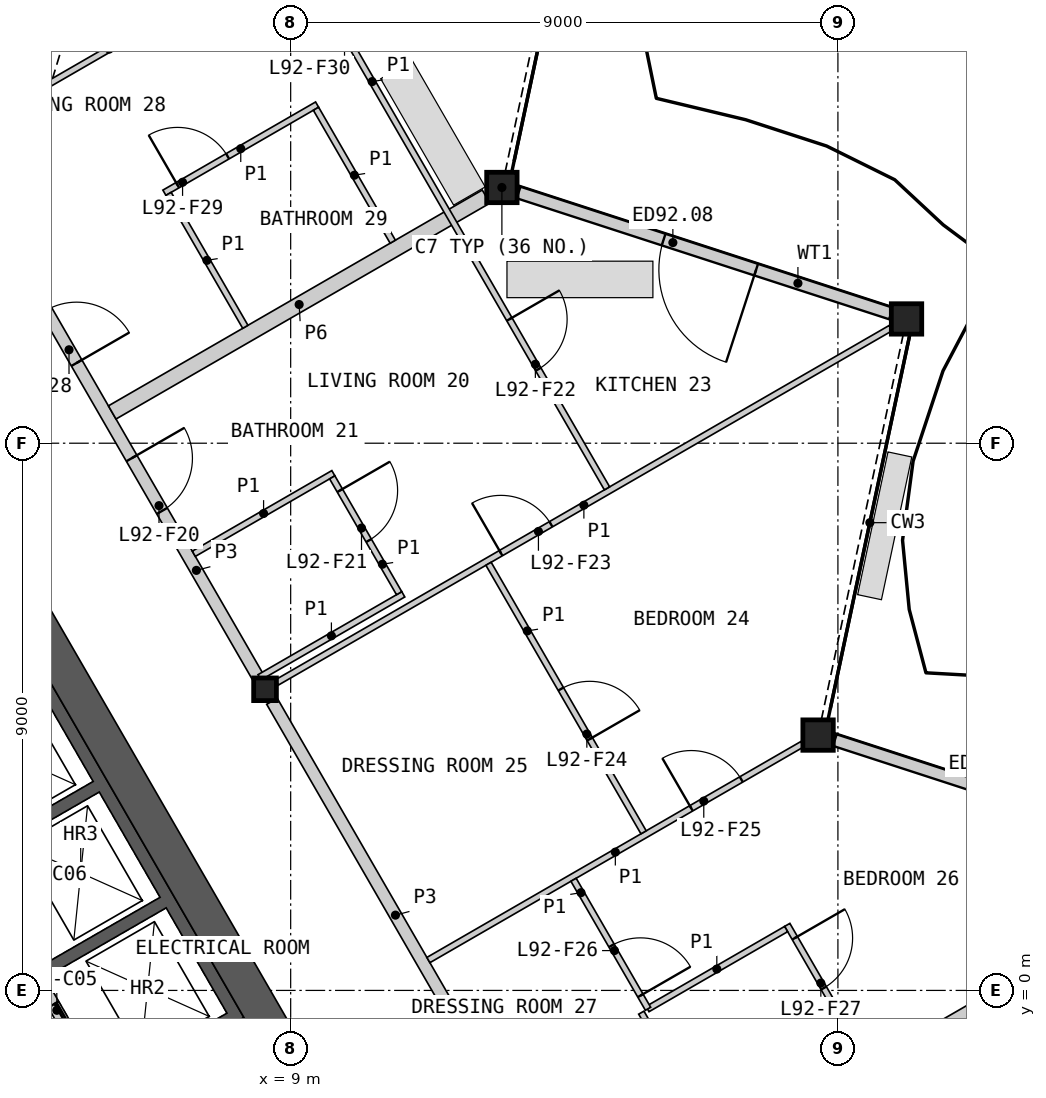
"""IFC4 building model, lengths in metres.
Left out: names, types, materials, properties, quantities, classifications, styles, units other than length and angle.
Written with IfcOpenShell. Run it as: python <this file> out.ifc"""

import sys

from ifc_helpers import new_model, si_unit, direction, frame, frame_2d, origin, origin_2d, place, context, subcontext, project, spatial, polyline, rectangle, hollow_rectangle, i_section, outline, extrude, element, fill, save


model = new_model("IFC4")
c1 = context("Model", 3, precision=1e-05, world=origin(), true_north=direction((0.0, 1.0)))
c2 = subcontext(c1, "Body", "Model", "MODEL_VIEW")
j1 = project(units=[si_unit("LENGTHUNIT", "METRE"), si_unit("PLANEANGLEUNIT", "RADIAN")], contexts=[c1])
p1 = place(None, origin())
s1 = spatial("IfcSite", under=j1, at=p1, CompositionType="ELEMENT")
p2 = place(p1, origin())
s2 = spatial("IfcBuilding", under=s1, at=p2, CompositionType="ELEMENT")
p3 = place(p2, frame((0.0, 0.0, 401.8)))
s3 = spatial("IfcBuildingStorey", under=s2, at=p3, CompositionType="ELEMENT", Elevation=401.8)
for number, where, z_axis, x_axis in (
    (1, (17.674, 4.199, 0.0), (0.0, 0.0, 1.0), (1.0, 0.0, 0.0)),
    (2, (19.129, 11.044, 0.0), (0.0, 0.0, 1.0), (1.0, 0.0, 0.0)),
    (3, (12.474, 13.206, 0.0), (0.0, 0.0, 1.0), (1.0, 0.0, 0.0)),
):
    element("IfcColumn", number, at=place(p3, frame(where, z_axis=z_axis, x_axis=x_axis)), inside=s3, PredefinedType="COLUMN", context=c2, shape_type="SweptSolid", body=[
        extrude(hollow_rectangle(XDim=0.5, YDim=0.5, WallThickness=0.03, at=origin_2d()), origin(), (0.0, 0.0, 1.0), 3.4),
    ])
p4 = place(p3, frame((8.578, 4.953, 0.0), z_axis=(0.0, 0.0, 1.0), x_axis=(1.0, 0.0, 0.0)))
e4 = element("IfcColumn", 4, at=p4, inside=s3, PredefinedType="COLUMN", context=c2, shape_type="SweptSolid", body=[
    extrude(i_section(OverallWidth=0.374, OverallDepth=0.372, WebThickness=0.016, FlangeThickness=0.026, at=origin_2d()), origin(), (0.0, 0.0, 1.0), 3.4),
])
p5 = place(p3, frame((24.074, 2.127, 0.0), z_axis=(0.0, 0.0, 1.0), x_axis=(-0.951055516513, 0.309020071371, 0.0)))
e5 = element("IfcWall", 5, at=p5, inside=s3, PredefinedType="SOLIDWALL", context=c2, shape_type="SweptSolid", body=[
    extrude(rectangle(XDim=6.44, YDim=0.2, at=frame_2d((3.22, 0.0))), origin(), (0.0, 0.0, 1.0), 2.634),
])
p6 = place(p5, frame((2.333, 0.0, 0.0)))
e6 = element("IfcOpeningElement", 6, at=p6, cuts=e5, PredefinedType="OPENING", context=c2, shape_type="SweptSolid", body=[
    extrude(rectangle(XDim=1.6, YDim=2.25, at=frame_2d((0.8, 1.125))), frame((0.0, 0.11, 0.0), z_axis=(0.0, -1.0, 0.0), x_axis=(1.0, 0.0, 0.0)), (0.0, 0.0, 1.0), 0.22),
])
p7 = place(p3, frame((18.874, 11.134, 0.0), z_axis=(0.0, 0.0, 1.0), x_axis=(-0.951063037463, 0.308996923563, 0.0)))
e7 = element("IfcWall", 7, at=p7, inside=s3, PredefinedType="SOLIDWALL", context=c2, shape_type="SweptSolid", body=[
    extrude(rectangle(XDim=6.44, YDim=0.2, at=frame_2d((3.22, 0.0))), origin(), (0.0, 0.0, 1.0), 2.634),
])
p8 = place(p7, frame((2.333, 0.0, 0.0)))
e8 = element("IfcOpeningElement", 8, at=p8, cuts=e7, PredefinedType="OPENING", context=c2, shape_type="SweptSolid", body=[
    extrude(rectangle(XDim=1.6, YDim=2.25, at=frame_2d((0.8, 1.125))), frame((0.0, 0.11, 0.0), z_axis=(0.0, -1.0, 0.0), x_axis=(1.0, 0.0, 0.0)), (0.0, 0.0, 1.0), 0.22),
])
p9 = place(p3, origin())
e9 = element("IfcWall", 9, at=p9, inside=s3, PredefinedType="SHEAR", context=c2, shape_type="SweptSolid", body=[
    extrude(outline(polyline([(1.561, 6.097), (3.731, 7.35), (8.231, -0.444), (6.061, -1.697), (5.96, -1.524), (7.952, -0.374), (6.952, 1.358), (4.96, 0.208), (4.861, 0.381), (6.852, 1.531), (5.852, 3.263), (3.861, 2.113), (3.76, 2.287), (5.752, 3.437), (4.752, 5.169), (2.76, 4.019), (2.66, 4.192), (4.652, 5.342), (3.652, 7.074), (1.66, 5.924), (1.561, 6.097)])), origin(), (0.0, 0.0, 1.0), 3.1),
])
p10 = place(p3, frame((5.817, -1.476, 0.0), z_axis=(0.0, 0.0, 1.0), x_axis=(-0.500002616675, 0.866023893041, 0.0)))
e10 = element("IfcWall", 10, at=p10, inside=s3, PredefinedType="SOLIDWALL", context=c2, shape_type="SweptSolid", body=[
    extrude(rectangle(XDim=8.373, YDim=0.2, at=frame_2d((4.187, 0.0))), origin(), (0.0, 0.0, 1.0), 3.1),
])
p11 = place(p10, frame((0.337, 0.0, 0.0)))
e11 = element("IfcOpeningElement", 11, at=p11, cuts=e10, PredefinedType="OPENING", context=c2, shape_type="SweptSolid", body=[
    extrude(rectangle(XDim=1.1, YDim=2.1, at=frame_2d((0.55, 1.05))), frame((0.0, 0.11, 0.0), z_axis=(0.0, -1.0, 0.0), x_axis=(1.0, 0.0, 0.0)), (0.0, 0.0, 1.0), 0.22),
])
p12 = place(p10, frame((2.537, 0.0, 0.0)))
e12 = element("IfcOpeningElement", 12, at=p12, cuts=e10, PredefinedType="OPENING", context=c2, shape_type="SweptSolid", body=[
    extrude(rectangle(XDim=1.1, YDim=2.1, at=frame_2d((0.55, 1.05))), frame((0.0, 0.11, 0.0), z_axis=(0.0, -1.0, 0.0), x_axis=(1.0, 0.0, 0.0)), (0.0, 0.0, 1.0), 0.22),
])
p13 = place(p10, frame((4.737, 0.0, 0.0)))
e13 = element("IfcOpeningElement", 13, at=p13, cuts=e10, PredefinedType="OPENING", context=c2, shape_type="SweptSolid", body=[
    extrude(rectangle(XDim=1.1, YDim=2.1, at=frame_2d((0.55, 1.05))), frame((0.0, 0.11, 0.0), z_axis=(0.0, -1.0, 0.0), x_axis=(1.0, 0.0, 0.0)), (0.0, 0.0, 1.0), 0.22),
])
p14 = place(p10, frame((7.037, 0.0, 0.0)))
e14 = element("IfcOpeningElement", 14, at=p14, cuts=e10, PredefinedType="OPENING", context=c2, shape_type="SweptSolid", body=[
    extrude(rectangle(XDim=0.9, YDim=2.1, at=frame_2d((0.45, 1.05))), frame((0.0, 0.11, 0.0), z_axis=(0.0, -1.0, 0.0), x_axis=(1.0, 0.0, 0.0)), (0.0, 0.0, 1.0), 0.22),
])
p15 = place(p3, frame((8.686, -0.634, 0.0), z_axis=(0.0, 0.0, 1.0), x_axis=(-0.500004601921, 0.866022746848, 0.0)))
e15 = element("IfcWall", 15, at=p15, inside=s3, PredefinedType="SHEAR", context=c2, shape_type="SweptSolid", body=[
    extrude(rectangle(XDim=16.853, YDim=0.6, at=frame_2d((8.426, 0.0))), origin(), (0.0, 0.0, 1.0), 3.1),
])
p16 = place(p3, frame((8.692, 4.756, 0.0), z_axis=(0.0, 0.0, 1.0), x_axis=(0.500001682468, -0.866024432409, 0.0)))
e16 = element("IfcWall", 16, at=p16, inside=s3, PredefinedType="PARTITIONING", context=c2, shape_type="SweptSolid", body=[
    extrude(rectangle(XDim=8.124, YDim=0.2, at=frame_2d((4.062, 0.0))), origin(), (0.0, 0.0, 1.0), 3.1),
])
p17 = place(p3, frame((4.403, 12.185, 0.0), z_axis=(0.0, 0.0, 1.0), x_axis=(0.499992155518, -0.866029932751, 0.0)))
e17 = element("IfcWall", 17, at=p17, inside=s3, PredefinedType="PARTITIONING", context=c2, shape_type="SweptSolid", body=[
    extrude(rectangle(XDim=8.123, YDim=0.2, at=frame_2d((4.062, 0.0))), origin(), (0.0, 0.0, 1.0), 3.1),
])
p18 = place(p17, frame((3.963, 0.0, 0.0)))
e18 = element("IfcOpeningElement", 18, at=p18, cuts=e17, PredefinedType="OPENING", context=c2, shape_type="SweptSolid", body=[
    extrude(rectangle(XDim=1.0, YDim=2.1, at=frame_2d((0.5, 1.05))), frame((0.0, 0.11, 0.0), z_axis=(0.0, -1.0, 0.0), x_axis=(1.0, 0.0, 0.0)), (0.0, 0.0, 1.0), 0.22),
])
p19 = place(p17, frame((1.153, 0.0, 0.0)))
e19 = element("IfcOpeningElement", 19, at=p19, cuts=e17, PredefinedType="OPENING", context=c2, shape_type="SweptSolid", body=[
    extrude(rectangle(XDim=1.0, YDim=2.1, at=frame_2d((0.5, 1.05))), frame((0.0, 0.11, 0.0), z_axis=(0.0, -1.0, 0.0), x_axis=(1.0, 0.0, 0.0)), (0.0, 0.0, 1.0), 0.22),
])
p20 = place(p3, frame((6.065, 9.506, 0.0), z_axis=(0.0, 0.0, 1.0), x_axis=(0.866018949465, 0.500011179042, 0.0)))
e20 = element("IfcWall", 20, at=p20, inside=s3, PredefinedType="PARTITIONING", context=c2, shape_type="SweptSolid", body=[
    extrude(rectangle(XDim=7.1, YDim=0.25, at=frame_2d((3.55, 0.0))), origin(), (0.0, 0.0, 1.0), 2.33),
])
p21 = place(p3, frame((18.585, -1.279, 0.0), z_axis=(0.0, 0.0, 1.0), x_axis=(0.866023139795, 0.500003921324, 0.0)))
e21 = element("IfcWall", 21, at=p21, inside=s3, PredefinedType="PARTITIONING", context=c2, shape_type="SweptSolid", body=[
    extrude(rectangle(XDim=6.332, YDim=0.25, at=frame_2d((3.166, 0.0))), origin(), (0.0, 0.0, 1.0), 2.33),
])
p22 = place(p3, frame((3.465, 14.01, 0.0), z_axis=(0.0, 0.0, 1.0), x_axis=(0.866032376801, 0.499987922186, 0.0)))
e22 = element("IfcWall", 22, at=p22, inside=s3, PredefinedType="PARTITIONING", context=c2, shape_type="SweptSolid", body=[
    extrude(rectangle(XDim=11.782, YDim=0.1, at=frame_2d((5.891, 0.0))), origin(), (0.0, 0.0, 1.0), 2.33),
])
p23 = place(p22, frame((7.171, 0.0, 0.0)))
e23 = element("IfcOpeningElement", 23, at=p23, cuts=e22, PredefinedType="OPENING", context=c2, shape_type="SweptSolid", body=[
    extrude(rectangle(XDim=0.95, YDim=2.1, at=frame_2d((0.475, 1.05))), frame((0.0, 0.06, 0.0), z_axis=(0.0, -1.0, 0.0), x_axis=(1.0, 0.0, 0.0)), (0.0, 0.0, 1.0), 0.12),
])
p24 = place(p3, frame((8.775, 5.066, 0.0), z_axis=(0.0, 0.0, 1.0), x_axis=(0.866023724155, 0.500002909193, 0.0)))
e24 = element("IfcWall", 24, at=p24, inside=s3, PredefinedType="PARTITIONING", context=c2, shape_type="SweptSolid", body=[
    extrude(rectangle(XDim=11.655, YDim=0.1, at=frame_2d((5.827, 0.0))), origin(), (0.0, 0.0, 1.0), 2.33),
])
p25 = place(p24, frame((4.252, 0.0, 0.0)))
e25 = element("IfcOpeningElement", 25, at=p25, cuts=e24, PredefinedType="OPENING", context=c2, shape_type="SweptSolid", body=[
    extrude(rectangle(XDim=0.95, YDim=2.1, at=frame_2d((0.475, 1.05))), frame((0.0, 0.06, 0.0), z_axis=(0.0, -1.0, 0.0), x_axis=(1.0, 0.0, 0.0)), (0.0, 0.0, 1.0), 0.12),
])
p26 = place(p3, frame((9.052, 17.177, 0.0), z_axis=(0.0, 0.0, 1.0), x_axis=(0.499998765615, -0.866026116456, 0.0)))
e26 = element("IfcWall", 26, at=p26, inside=s3, PredefinedType="PARTITIONING", context=c2, shape_type="SweptSolid", body=[
    extrude(rectangle(XDim=10.3, YDim=0.1, at=frame_2d((5.15, 0.0))), origin(), (0.0, 0.0, 1.0), 2.33),
])
p27 = place(p26, frame((7.089, 0.0, 0.0)))
e27 = element("IfcOpeningElement", 27, at=p27, cuts=e26, PredefinedType="OPENING", context=c2, shape_type="SweptSolid", body=[
    extrude(rectangle(XDim=0.95, YDim=2.1, at=frame_2d((0.475, 1.05))), frame((0.0, 0.06, 0.0), z_axis=(0.0, -1.0, 0.0), x_axis=(1.0, 0.0, 0.0)), (0.0, 0.0, 1.0), 0.12),
])
p28 = place(p26, frame((0.954, 0.0, 0.0)))
e28 = element("IfcOpeningElement", 28, at=p28, cuts=e26, PredefinedType="OPENING", context=c2, shape_type="SweptSolid", body=[
    extrude(rectangle(XDim=0.95, YDim=2.1, at=frame_2d((0.475, 1.05))), frame((0.0, 0.06, 0.0), z_axis=(0.0, -1.0, 0.0), x_axis=(1.0, 0.0, 0.0)), (0.0, 0.0, 1.0), 0.12),
])
p29 = place(p3, frame((11.265, 0.5, 0.0), z_axis=(0.0, 0.0, 1.0), x_axis=(0.866033839264, 0.499985389037, 0.0)))
e29 = element("IfcWall", 29, at=p29, inside=s3, PredefinedType="PARTITIONING", context=c2, shape_type="SweptSolid", body=[
    extrude(rectangle(XDim=7.1, YDim=0.1, at=frame_2d((3.55, 0.0))), origin(), (0.0, 0.0, 1.0), 2.33),
])
p30 = place(p29, frame((4.992, 0.0, 0.0)))
e30 = element("IfcOpeningElement", 30, at=p30, cuts=e29, PredefinedType="OPENING", context=c2, shape_type="SweptSolid", body=[
    extrude(rectangle(XDim=0.95, YDim=2.1, at=frame_2d((0.475, 1.05))), frame((0.0, 0.06, 0.0), z_axis=(0.0, -1.0, 0.0), x_axis=(1.0, 0.0, 0.0)), (0.0, 0.0, 1.0), 0.12),
])
p31 = place(p3, frame((14.767, -0.365, 0.0), z_axis=(0.0, 0.0, 1.0), x_axis=(0.500002931134, -0.866023711487, 0.0)))
e31 = element("IfcWall", 31, at=p31, inside=s3, PredefinedType="PARTITIONING", context=c2, shape_type="SweptSolid", body=[
    extrude(rectangle(XDim=5.45, YDim=0.1, at=frame_2d((2.725, 0.0))), origin(), (0.0, 0.0, 1.0), 2.33),
])
p32 = place(p3, frame((17.167, 1.078, 0.0), z_axis=(0.0, 0.0, 1.0), x_axis=(0.499996545922, -0.866027397988, 0.0)))
e32 = element("IfcWall", 32, at=p32, inside=s3, PredefinedType="PARTITIONING", context=c2, shape_type="SweptSolid", body=[
    extrude(rectangle(XDim=5.5, YDim=0.1, at=frame_2d((2.75, 0.0))), origin(), (0.0, 0.0, 1.0), 2.33),
])
p33 = place(p32, frame((4.199, 0.0, 0.0)))
e33 = element("IfcOpeningElement", 33, at=p33, cuts=e32, PredefinedType="OPENING", context=c2, shape_type="SweptSolid", body=[
    extrude(rectangle(XDim=0.95, YDim=2.1, at=frame_2d((0.475, 1.05))), frame((0.0, 0.06, 0.0), z_axis=(0.0, -1.0, 0.0), x_axis=(1.0, 0.0, 0.0)), (0.0, 0.0, 1.0), 0.12),
])
p34 = place(p32, frame((0.25, 0.0, 0.0)))
e34 = element("IfcOpeningElement", 34, at=p34, cuts=e32, PredefinedType="OPENING", context=c2, shape_type="SweptSolid", body=[
    extrude(rectangle(XDim=0.95, YDim=2.1, at=frame_2d((0.475, 1.05))), frame((0.0, 0.06, 0.0), z_axis=(0.0, -1.0, 0.0), x_axis=(1.0, 0.0, 0.0)), (0.0, 0.0, 1.0), 0.12),
])
p35 = place(p3, frame((12.254, 7.017, 0.0), z_axis=(0.0, 0.0, 1.0), x_axis=(0.500005610874, -0.86602216432, 0.0)))
e35 = element("IfcWall", 35, at=p35, inside=s3, PredefinedType="PARTITIONING", context=c2, shape_type="SweptSolid", body=[
    extrude(rectangle(XDim=5.1, YDim=0.1, at=frame_2d((2.55, 0.0))), origin(), (0.0, 0.0, 1.0), 2.33),
])
p36 = place(p35, frame((2.379, 0.0, 0.0)))
e36 = element("IfcOpeningElement", 36, at=p36, cuts=e35, PredefinedType="OPENING", context=c2, shape_type="SweptSolid", body=[
    extrude(rectangle(XDim=0.95, YDim=2.1, at=frame_2d((0.475, 1.05))), frame((0.0, 0.06, 0.0), z_axis=(0.0, -1.0, 0.0), x_axis=(1.0, 0.0, 0.0)), (0.0, 0.0, 1.0), 0.12),
])
p37 = place(p3, frame((6.923, 13.119, 0.0), z_axis=(0.0, 0.0, 1.0), x_axis=(0.866032775405, 0.499987231761, 0.0)))
e37 = element("IfcWall", 37, at=p37, inside=s3, PredefinedType="PARTITIONING", context=c2, shape_type="SweptSolid", body=[
    extrude(rectangle(XDim=2.9, YDim=0.1, at=frame_2d((1.45, 0.0))), origin(), (0.0, 0.0, 1.0), 2.33),
])
p38 = place(p37, frame((0.25, 0.0, 0.0)))
e38 = element("IfcOpeningElement", 38, at=p38, cuts=e37, PredefinedType="OPENING", context=c2, shape_type="SweptSolid", body=[
    extrude(rectangle(XDim=0.95, YDim=2.1, at=frame_2d((0.475, 1.05))), frame((0.0, 0.06, 0.0), z_axis=(0.0, -1.0, 0.0), x_axis=(1.0, 0.0, 0.0)), (0.0, 0.0, 1.0), 0.12),
])
p39 = place(p3, frame((7.407, 7.182, 0.0), z_axis=(0.0, 0.0, 1.0), x_axis=(0.866052124492, 0.499953715521, 0.0)))
e39 = element("IfcWall", 39, at=p39, inside=s3, PredefinedType="PARTITIONING", context=c2, shape_type="SweptSolid", body=[
    extrude(rectangle(XDim=2.65, YDim=0.1, at=frame_2d((1.325, 0.0))), origin(), (0.0, 0.0, 1.0), 2.33),
])
p40 = place(p3, frame((9.417, 14.501, 0.0), z_axis=(0.0, 0.0, 1.0), x_axis=(0.500048846702, -0.865997200291, 0.0)))
e40 = element("IfcWall", 40, at=p40, inside=s3, PredefinedType="PARTITIONING", context=c2, shape_type="SweptSolid", body=[
    extrude(rectangle(XDim=2.525, YDim=0.1, at=frame_2d((1.263, 0.0))), origin(), (0.0, 0.0, 1.0), 2.33),
])
p41 = place(p3, frame((6.992, 13.101, 0.0), z_axis=(0.0, 0.0, 1.0), x_axis=(0.499976333282, -0.866039067339, 0.0)))
e41 = element("IfcWall", 41, at=p41, inside=s3, PredefinedType="PARTITIONING", context=c2, shape_type="SweptSolid", body=[
    extrude(rectangle(XDim=2.525, YDim=0.1, at=frame_2d((1.262, 0.0))), origin(), (0.0, 0.0, 1.0), 2.33),
])
p42 = place(p3, frame((14.868, -0.307, 0.0), z_axis=(0.0, 0.0, 1.0), x_axis=(0.865997164422, 0.50004890882, 0.0)))
e42 = element("IfcWall", 42, at=p42, inside=s3, PredefinedType="PARTITIONING", context=c2, shape_type="SweptSolid", body=[
    extrude(rectangle(XDim=2.633, YDim=0.1, at=frame_2d((1.316, 0.0))), origin(), (0.0, 0.0, 1.0), 2.33),
])
p43 = place(p3, frame((8.488, 5.15, 0.0), z_axis=(0.0, 0.0, 1.0), x_axis=(0.866027727466, 0.499995975244, 0.0)))
e43 = element("IfcWall", 43, at=p43, inside=s3, PredefinedType="PARTITIONING", context=c2, shape_type="SweptSolid", body=[
    extrude(rectangle(XDim=2.73, YDim=0.1, at=frame_2d((1.365, 0.0))), origin(), (0.0, 0.0, 1.0), 2.33),
])
p44 = place(p3, frame((13.652, 1.82, 0.0), z_axis=(0.0, 0.0, 1.0), x_axis=(0.500018594424, -0.866014668023, 0.0)))
e44 = element("IfcWall", 44, at=p44, inside=s3, PredefinedType="PARTITIONING", context=c2, shape_type="SweptSolid", body=[
    extrude(rectangle(XDim=2.45, YDim=0.1, at=frame_2d((1.225, 0.0))), origin(), (0.0, 0.0, 1.0), 2.33),
])
p45 = place(p44, frame((1.25, 0.0, 0.0)))
e45 = element("IfcOpeningElement", 45, at=p45, cuts=e44, PredefinedType="OPENING", context=c2, shape_type="SweptSolid", body=[
    extrude(rectangle(XDim=0.95, YDim=2.1, at=frame_2d((0.475, 1.05))), frame((0.0, 0.06, 0.0), z_axis=(0.0, -1.0, 0.0), x_axis=(1.0, 0.0, 0.0)), (0.0, 0.0, 1.0), 0.12),
])
p46 = place(p3, frame((9.684, 8.438, 0.0), z_axis=(0.0, 0.0, 1.0), x_axis=(0.499994660107, -0.866028486751, 0.0)))
e46 = element("IfcWall", 46, at=p46, inside=s3, PredefinedType="PARTITIONING", context=c2, shape_type="SweptSolid", body=[
    extrude(rectangle(XDim=2.2, YDim=0.1, at=frame_2d((1.1, 0.0))), origin(), (0.0, 0.0, 1.0), 2.33),
])
p47 = place(p46, frame((0.25, 0.0, 0.0)))
e47 = element("IfcOpeningElement", 47, at=p47, cuts=e46, PredefinedType="OPENING", context=c2, shape_type="SweptSolid", body=[
    extrude(rectangle(XDim=0.95, YDim=2.1, at=frame_2d((0.475, 1.05))), frame((0.0, 0.06, 0.0), z_axis=(0.0, -1.0, 0.0), x_axis=(1.0, 0.0, 0.0)), (0.0, 0.0, 1.0), 0.12),
])
p48 = place(p8, origin())
e48 = element("IfcDoor", 48, at=p48, inside=s3, OperationType="DOUBLE_DOOR_SINGLE_SWING", PredefinedType="DOOR", context=c2, shape_type="SweptSolid", body=[
    extrude(rectangle(XDim=1.6, YDim=2.25, at=frame_2d((0.8, 1.125))), frame((0.0, 0.025, 0.0), z_axis=(0.0, -1.0, 0.0), x_axis=(1.0, 0.0, 0.0)), (0.0, 0.0, 1.0), 0.05),
])
fill(e8, e48)
p49 = place(p11, origin())
e49 = element("IfcDoor", 49, at=p49, inside=s3, OperationType="SLIDING_TO_LEFT", PredefinedType="DOOR", context=c2, shape_type="SweptSolid", body=[
    extrude(rectangle(XDim=1.1, YDim=2.1, at=frame_2d((0.55, 1.05))), frame((0.0, 0.025, 0.0), z_axis=(0.0, -1.0, 0.0), x_axis=(1.0, 0.0, 0.0)), (0.0, 0.0, 1.0), 0.05),
])
fill(e11, e49)
p50 = place(p18, origin())
e50 = element("IfcDoor", 50, at=p50, inside=s3, OperationType="SINGLE_SWING_LEFT", PredefinedType="DOOR", context=c2, shape_type="SweptSolid", body=[
    extrude(rectangle(XDim=1.0, YDim=2.1, at=frame_2d((0.5, 1.05))), frame((0.0, 0.025, 0.0), z_axis=(0.0, -1.0, 0.0), x_axis=(1.0, 0.0, 0.0)), (0.0, 0.0, 1.0), 0.05),
])
fill(e18, e50)
p51 = place(p47, origin())
e51 = element("IfcDoor", 51, at=p51, inside=s3, OperationType="SINGLE_SWING_LEFT", PredefinedType="DOOR", context=c2, shape_type="SweptSolid", body=[
    extrude(rectangle(XDim=0.95, YDim=2.1, at=frame_2d((0.475, 1.05))), frame((0.0, 0.025, 0.0), z_axis=(0.0, -1.0, 0.0), x_axis=(1.0, 0.0, 0.0)), (0.0, 0.0, 1.0), 0.05),
])
fill(e47, e51)
p52 = place(p27, origin())
e52 = element("IfcDoor", 52, at=p52, inside=s3, OperationType="SINGLE_SWING_LEFT", PredefinedType="DOOR", context=c2, shape_type="SweptSolid", body=[
    extrude(rectangle(XDim=0.95, YDim=2.1, at=frame_2d((0.475, 1.05))), frame((0.0, 0.025, 0.0), z_axis=(0.0, -1.0, 0.0), x_axis=(1.0, 0.0, 0.0)), (0.0, 0.0, 1.0), 0.05),
])
fill(e27, e52)
p53 = place(p25, origin())
e53 = element("IfcDoor", 53, at=p53, inside=s3, OperationType="SINGLE_SWING_LEFT", PredefinedType="DOOR", context=c2, shape_type="SweptSolid", body=[
    extrude(rectangle(XDim=0.95, YDim=2.1, at=frame_2d((0.475, 1.05))), frame((0.0, 0.025, 0.0), z_axis=(0.0, -1.0, 0.0), x_axis=(1.0, 0.0, 0.0)), (0.0, 0.0, 1.0), 0.05),
])
fill(e25, e53)
p54 = place(p36, origin())
e54 = element("IfcDoor", 54, at=p54, inside=s3, OperationType="SINGLE_SWING_RIGHT", PredefinedType="DOOR", context=c2, shape_type="SweptSolid", body=[
    extrude(rectangle(XDim=0.95, YDim=2.1, at=frame_2d((0.475, 1.05))), frame((0.0, 0.025, 0.0), z_axis=(0.0, -1.0, 0.0), x_axis=(1.0, 0.0, 0.0)), (0.0, 0.0, 1.0), 0.05),
])
fill(e36, e54)
p55 = place(p30, origin())
e55 = element("IfcDoor", 55, at=p55, inside=s3, OperationType="SINGLE_SWING_LEFT", PredefinedType="DOOR", context=c2, shape_type="SweptSolid", body=[
    extrude(rectangle(XDim=0.95, YDim=2.1, at=frame_2d((0.475, 1.05))), frame((0.0, 0.025, 0.0), z_axis=(0.0, -1.0, 0.0), x_axis=(1.0, 0.0, 0.0)), (0.0, 0.0, 1.0), 0.05),
])
fill(e30, e55)
p56 = place(p45, origin())
e56 = element("IfcDoor", 56, at=p56, inside=s3, OperationType="SINGLE_SWING_RIGHT", PredefinedType="DOOR", context=c2, shape_type="SweptSolid", body=[
    extrude(rectangle(XDim=0.95, YDim=2.1, at=frame_2d((0.475, 1.05))), frame((0.0, 0.025, 0.0), z_axis=(0.0, -1.0, 0.0), x_axis=(1.0, 0.0, 0.0)), (0.0, 0.0, 1.0), 0.05),
])
fill(e45, e56)
p57 = place(p34, origin())
e57 = element("IfcDoor", 57, at=p57, inside=s3, OperationType="SINGLE_SWING_LEFT", PredefinedType="DOOR", context=c2, shape_type="SweptSolid", body=[
    extrude(rectangle(XDim=0.95, YDim=2.1, at=frame_2d((0.475, 1.05))), frame((0.0, 0.025, 0.0), z_axis=(0.0, -1.0, 0.0), x_axis=(1.0, 0.0, 0.0)), (0.0, 0.0, 1.0), 0.05),
])
fill(e34, e57)
p58 = place(p19, origin())
e58 = element("IfcDoor", 58, at=p58, inside=s3, OperationType="SINGLE_SWING_RIGHT", PredefinedType="DOOR", context=c2, shape_type="SweptSolid", body=[
    extrude(rectangle(XDim=1.0, YDim=2.1, at=frame_2d((0.5, 1.05))), frame((0.0, 0.025, 0.0), z_axis=(0.0, -1.0, 0.0), x_axis=(1.0, 0.0, 0.0)), (0.0, 0.0, 1.0), 0.05),
])
fill(e19, e58)
p59 = place(p38, origin())
e59 = element("IfcDoor", 59, at=p59, inside=s3, OperationType="SINGLE_SWING_LEFT", PredefinedType="DOOR", context=c2, shape_type="SweptSolid", body=[
    extrude(rectangle(XDim=0.95, YDim=2.1, at=frame_2d((0.475, 1.05))), frame((0.0, 0.025, 0.0), z_axis=(0.0, -1.0, 0.0), x_axis=(1.0, 0.0, 0.0)), (0.0, 0.0, 1.0), 0.05),
])
fill(e38, e59)
save(model, sys.argv[1])
